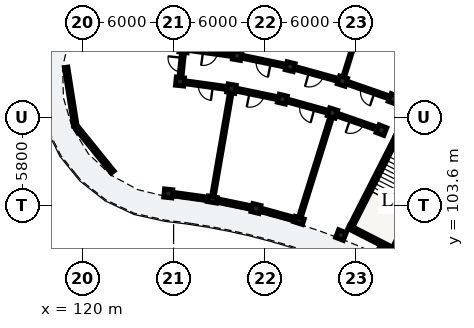
"""IFC4 building model, lengths in metres.
Left out: names, types, materials, properties, quantities, classifications, styles, units other than length and angle.
Written with IfcOpenShell. Run it as: python <this file> out.ifc"""

import sys

from ifc_helpers import new_model, si_unit, direction, frame, frame_2d, origin, origin_2d, place, context, subcontext, project, spatial, rectangle, extrude, element, fill, save


model = new_model("IFC4")
c1 = context("Model", 3, precision=1e-05, world=origin(), true_north=direction((0.0, 1.0)))
c2 = subcontext(c1, "Body", "Model", "MODEL_VIEW")
j1 = project(units=[si_unit("LENGTHUNIT", "METRE"), si_unit("PLANEANGLEUNIT", "RADIAN")], contexts=[c1])
p1 = place(None, origin())
s1 = spatial("IfcSite", under=j1, at=p1, CompositionType="ELEMENT")
p2 = place(p1, origin())
s2 = spatial("IfcBuilding", under=s1, at=p2, CompositionType="ELEMENT")
p3 = place(p2, frame((0.0, 0.0, 15.56)))
s3 = spatial("IfcBuildingStorey", under=s2, at=p3, CompositionType="ELEMENT", Elevation=15.56)
p4 = place(p3, frame((140.684, 108.139, 0.0), z_axis=(0.0, 0.0, 1.0), x_axis=(-0.453992276384, -0.891005618941, 0.0)))
e1 = element("IfcWall", 1, at=p4, inside=s3, PredefinedType="SHEAR", context=c2, shape_type="SweptSolid", body=[
    extrude(rectangle(XDim=6.6, YDim=0.25, at=frame_2d((3.3, 0.0))), origin(), (0.0, 0.0, 1.0), 3.11),
])
p5 = place(p3, frame((137.52, 102.203, 0.0), z_axis=(0.0, 0.0, 1.0), x_axis=(0.891003540237, -0.453996356025, 0.0)))
e2 = element("IfcWall", 2, at=p5, inside=s3, PredefinedType="SHEAR", context=c2, shape_type="SweptSolid", body=[
    extrude(rectangle(XDim=3.42, YDim=0.25, at=frame_2d((1.71, 0.0))), origin(), (0.0, 0.0, 1.0), 3.11),
])
p6 = place(p3, frame((143.509, 106.699, 0.0), z_axis=(0.0, 0.0, 1.0), x_axis=(-0.453992276384, -0.891005618941, 0.0)))
e3 = element("IfcWall", 3, at=p6, inside=s3, PredefinedType="SHEAR", context=c2, shape_type="SweptSolid", body=[
    extrude(rectangle(XDim=6.6, YDim=0.25, at=frame_2d((3.3, 0.0))), origin(), (0.0, 0.0, 1.0), 3.11),
])
p7 = place(p6, frame((0.22, 0.0, 0.0)))
e4 = element("IfcOpeningElement", 4, at=p7, cuts=e3, PredefinedType="OPENING", context=c2, shape_type="SweptSolid", body=[
    extrude(rectangle(XDim=1.05, YDim=2.15, at=frame_2d((0.525, 1.075))), frame((0.0, 0.135, 0.0), z_axis=(0.0, -1.0, 0.0), x_axis=(1.0, 0.0, 0.0)), (0.0, 0.0, 1.0), 0.27),
])
for number, where, z_axis, x_axis in (
    (5, (137.01, 101.667, 0.0), (0.0, 0.0, 1.0), (0.36, 0.933, 0.0)),
    (6, (139.675, 108.57, 0.0), (0.0, 0.0, 1.0), (0.36, 0.933, 0.0)),
    (7, (140.468, 110.622, 0.0), (0.0, 0.0, 1.0), (0.36, 0.933, 0.0)),
):
    element("IfcColumn", number, at=place(p3, frame(where, z_axis=z_axis, x_axis=x_axis)), inside=s3, PredefinedType="COLUMN", context=c2, shape_type="SweptSolid", body=[
        extrude(rectangle(XDim=0.55, YDim=0.55, at=origin_2d()), origin(), (0.0, 0.0, 1.0), 3.11),
    ])
p8 = place(p3, frame((134.243, 102.631, 0.0), z_axis=(0.0, 0.0, 1.0), x_axis=(0.297930225503, 0.954587649581, 0.0)))
e8 = element("IfcColumn", 8, at=p8, inside=s3, PredefinedType="PILASTER", context=c2, shape_type="SweptSolid", body=[
    extrude(rectangle(XDim=0.38, YDim=0.62, at=origin_2d()), origin(), (0.0, 0.0, 1.0), 3.11),
])
for number, where, z_axis, x_axis in (
    (9, (136.448, 109.695, 0.0), (0.0, 0.0, 1.0), (0.298, 0.955, 0.0)),
    (10, (137.103, 111.795, 0.0), (0.0, 0.0, 1.0), (0.298, 0.955, 0.0)),
    (11, (131.418, 103.412, 0.0), (0.0, 0.0, 1.0), (0.234, 0.972, 0.0)),
    (12, (133.153, 110.606, 0.0), (0.0, 0.0, 1.0), (0.234, 0.972, 0.0)),
    (13, (133.669, 112.744, 0.0), (0.0, 0.0, 1.0), (0.234, 0.972, 0.0)),
):
    element("IfcColumn", number, at=place(p3, frame(where, z_axis=z_axis, x_axis=x_axis)), inside=s3, PredefinedType="COLUMN", context=c2, shape_type="SweptSolid", body=[
        extrude(rectangle(XDim=0.55, YDim=0.55, at=origin_2d()), origin(), (0.0, 0.0, 1.0), 3.11),
    ])
p9 = place(p3, frame((128.549, 104.004, 0.0), z_axis=(0.0, 0.0, 1.0), x_axis=(0.169827230012, 0.985473851478, 0.0)))
e14 = element("IfcColumn", 14, at=p9, inside=s3, PredefinedType="PILASTER", context=c2, shape_type="SweptSolid", body=[
    extrude(rectangle(XDim=0.38, YDim=0.62, at=origin_2d()), origin(), (0.0, 0.0, 1.0), 3.11),
])
for number, where, z_axis, x_axis in (
    (15, (129.806, 111.297, 0.0), (0.0, 0.0, 1.0), (0.17, 0.985, 0.0)),
    (16, (130.179, 113.465, 0.0), (0.0, 0.0, 1.0), (0.17, 0.985, 0.0)),
    (17, (125.646, 104.406, 0.0), (0.0, 0.0, 1.0), (0.105, 0.995, 0.0)),
    (18, (126.42, 111.766, 0.0), (0.0, 0.0, 1.0), (0.105, 0.995, 0.0)),
    (19, (126.65, 113.954, 0.0), (0.0, 0.0, 1.0), (0.105, 0.995, 0.0)),
):
    element("IfcColumn", number, at=place(p3, frame(where, z_axis=z_axis, x_axis=x_axis)), inside=s3, PredefinedType="COLUMN", context=c2, shape_type="SweptSolid", body=[
        extrude(rectangle(XDim=0.55, YDim=0.55, at=origin_2d()), origin(), (0.0, 0.0, 1.0), 3.11),
    ])
p10 = place(p3, frame((134.089, 102.674, 0.0), z_axis=(0.0, 0.0, 1.0), x_axis=(-0.963901971286, 0.266257375017, 0.0)))
e20 = element("IfcWall", 20, at=p10, inside=s3, PredefinedType="SOLIDWALL", context=c2, shape_type="SweptSolid", body=[
    extrude(rectangle(XDim=2.525, YDim=0.24, at=frame_2d((1.263, 0.0))), origin(), (0.0, 0.0, 1.0), 2.355),
])
p11 = place(p10, frame((0.583, 0.0, 0.55)))
e21 = element("IfcOpeningElement", 21, at=p11, cuts=e20, PredefinedType="OPENING", context=c2, shape_type="SweptSolid", body=[
    extrude(rectangle(XDim=1.36, YDim=1.61, at=frame_2d((0.68, 0.805))), frame((0.0, 0.13, 0.0), z_axis=(0.0, -1.0, 0.0), x_axis=(1.0, 0.0, 0.0)), (0.0, 0.0, 1.0), 0.26),
])
p12 = place(p3, frame((131.179, 103.461, 0.0), z_axis=(0.0, 0.0, 1.0), x_axis=(-0.979353576928, 0.202154820272, 0.0)))
e22 = element("IfcWall", 22, at=p12, inside=s3, PredefinedType="SOLIDWALL", context=c2, shape_type="SweptSolid", body=[
    extrude(rectangle(XDim=2.525, YDim=0.24, at=frame_2d((1.263, 0.0))), origin(), (0.0, 0.0, 1.0), 2.355),
])
p13 = place(p12, frame((0.523, 0.0, 0.55)))
e23 = element("IfcOpeningElement", 23, at=p13, cuts=e22, PredefinedType="OPENING", context=c2, shape_type="SweptSolid", body=[
    extrude(rectangle(XDim=1.48, YDim=1.46, at=frame_2d((0.74, 0.73))), frame((0.0, 0.13, 0.0), z_axis=(0.0, -1.0, 0.0), x_axis=(1.0, 0.0, 0.0)), (0.0, 0.0, 1.0), 0.26),
])
p14 = place(p3, frame((128.39, 104.026, 0.0), z_axis=(0.0, 0.0, 1.0), x_axis=(-0.990545622952, 0.13718370476, 0.0)))
e24 = element("IfcWall", 24, at=p14, inside=s3, PredefinedType="SOLIDWALL", context=c2, shape_type="SweptSolid", body=[
    extrude(rectangle(XDim=2.525, YDim=0.24, at=frame_2d((1.263, 0.0))), origin(), (0.0, 0.0, 1.0), 2.355),
])
p15 = place(p14, frame((0.463, 0.0, 0.55)))
e25 = element("IfcOpeningElement", 25, at=p15, cuts=e24, PredefinedType="OPENING", context=c2, shape_type="SweptSolid", body=[
    extrude(rectangle(XDim=1.6, YDim=1.535, at=frame_2d((0.8, 0.768))), frame((0.0, 0.13, 0.0), z_axis=(0.0, -1.0, 0.0), x_axis=(1.0, 0.0, 0.0)), (0.0, 0.0, 1.0), 0.26),
])
p16 = place(p3, frame((121.998, 105.807, 0.0), z_axis=(0.0, 0.0, 1.0), x_axis=(-0.629331205321, 0.777137204109, 0.0)))
e26 = element("IfcWall", 26, at=p16, inside=s3, PredefinedType="SOLIDWALL", context=c2, shape_type="SweptSolid", body=[
    extrude(rectangle(XDim=3.908, YDim=0.24, at=frame_2d((1.954, 0.0))), origin(), (0.0, 0.0, 1.0), 2.355),
])
p17 = place(p3, frame((119.538, 108.844, 0.0), z_axis=(0.0, 0.0, 1.0), x_axis=(-0.15648221771, 0.987680776132, 0.0)))
e27 = element("IfcWall", 27, at=p17, inside=s3, PredefinedType="SOLIDWALL", context=c2, shape_type="SweptSolid", body=[
    extrude(rectangle(XDim=3.908, YDim=0.24, at=frame_2d((1.954, 0.0))), origin(), (0.0, 0.0, 1.0), 2.355),
])
p18 = place(p17, frame((1.029, 0.0, 0.4)))
e28 = element("IfcOpeningElement", 28, at=p18, cuts=e27, PredefinedType="OPENING", context=c2, shape_type="SweptSolid", body=[
    extrude(rectangle(XDim=1.85, YDim=1.72, at=frame_2d((0.925, 0.86))), frame((0.0, 0.13, 0.0), z_axis=(0.0, -1.0, 0.0), x_axis=(1.0, 0.0, 0.0)), (0.0, 0.0, 1.0), 0.26),
])
p19 = place(p3, frame((140.137, 110.738, 0.0), z_axis=(0.0, 0.0, 1.0), x_axis=(-0.944253820929, 0.329218349522, 0.0)))
e29 = element("IfcWall", 29, at=p19, inside=s3, PredefinedType="PARTITIONING", context=c2, shape_type="SweptSolid", body=[
    extrude(rectangle(XDim=2.863, YDim=0.205, at=frame_2d((1.432, 0.0))), origin(), (0.0, 0.0, 1.0), 2.37),
])
p20 = place(p19, frame((0.967, 0.0, 0.0)))
e30 = element("IfcOpeningElement", 30, at=p20, cuts=e29, PredefinedType="OPENING", context=c2, shape_type="SweptSolid", body=[
    extrude(rectangle(XDim=0.93, YDim=2.12, at=frame_2d((0.465, 1.06))), frame((0.0, 0.113, 0.0), z_axis=(0.0, -1.0, 0.0), x_axis=(1.0, 0.0, 0.0)), (0.0, 0.0, 1.0), 0.225),
])
p21 = place(p3, frame((139.345, 108.685, 0.0), z_axis=(0.0, 0.0, 1.0), x_axis=(-0.944265123647, 0.329185929627, 0.0)))
e31 = element("IfcWall", 31, at=p21, inside=s3, PredefinedType="PARTITIONING", context=c2, shape_type="SweptSolid", body=[
    extrude(rectangle(XDim=2.718, YDim=0.205, at=frame_2d((1.359, 0.0))), origin(), (0.0, 0.0, 1.0), 2.37),
])
p22 = place(p21, frame((0.894, 0.0, 0.0)))
e32 = element("IfcOpeningElement", 32, at=p22, cuts=e31, PredefinedType="OPENING", context=c2, shape_type="SweptSolid", body=[
    extrude(rectangle(XDim=0.93, YDim=2.12, at=frame_2d((0.465, 1.06))), frame((0.0, 0.113, 0.0), z_axis=(0.0, -1.0, 0.0), x_axis=(1.0, 0.0, 0.0)), (0.0, 0.0, 1.0), 0.225),
])
p23 = place(p3, frame((137.222, 112.177, 0.0), z_axis=(0.0, 0.0, 1.0), x_axis=(0.297905254614, 0.954595442726, 0.0)))
e33 = element("IfcWall", 33, at=p23, inside=s3, PredefinedType="PARTITIONING", context=c2, shape_type="SweptSolid", body=[
    extrude(rectangle(XDim=4.7, YDim=0.125, at=frame_2d((2.35, 0.0))), origin(), (0.0, 0.0, 1.0), 2.37),
])
p24 = place(p23, frame((1.895, 0.0, 0.0)))
e34 = element("IfcOpeningElement", 34, at=p24, cuts=e33, PredefinedType="OPENING", context=c2, shape_type="SweptSolid", body=[
    extrude(rectangle(XDim=0.91, YDim=2.1, at=frame_2d((0.455, 1.05))), frame((0.0, 0.073, 0.0), z_axis=(0.0, -1.0, 0.0), x_axis=(1.0, 0.0, 0.0)), (0.0, 0.0, 1.0), 0.145),
])
p25 = place(p3, frame((134.362, 103.013, 0.0), z_axis=(0.0, 0.0, 1.0), x_axis=(0.2979590431, 0.954578655028, 0.0)))
e35 = element("IfcWall", 35, at=p25, inside=s3, PredefinedType="PARTITIONING", context=c2, shape_type="SweptSolid", body=[
    extrude(rectangle(XDim=6.6, YDim=0.185, at=frame_2d((3.3, 0.0))), origin(), (0.0, 0.0, 1.0), 2.37),
])
p26 = place(p3, frame((136.766, 111.889, 0.0), z_axis=(0.0, 0.0, 1.0), x_axis=(-0.963890789093, 0.266297853356, 0.0)))
e36 = element("IfcWall", 36, at=p26, inside=s3, PredefinedType="PARTITIONING", context=c2, shape_type="SweptSolid", body=[
    extrude(rectangle(XDim=2.863, YDim=0.205, at=frame_2d((1.432, 0.0))), origin(), (0.0, 0.0, 1.0), 2.37),
])
p27 = place(p26, frame((0.937, 0.0, 0.0)))
e37 = element("IfcOpeningElement", 37, at=p27, cuts=e36, PredefinedType="OPENING", context=c2, shape_type="SweptSolid", body=[
    extrude(rectangle(XDim=0.99, YDim=2.16, at=frame_2d((0.495, 1.08))), frame((0.0, 0.113, 0.0), z_axis=(0.0, -1.0, 0.0), x_axis=(1.0, 0.0, 0.0)), (0.0, 0.0, 1.0), 0.225),
])
p28 = place(p3, frame((136.11, 109.789, 0.0), z_axis=(0.0, 0.0, 1.0), x_axis=(-0.96388375821, 0.266323301006, 0.0)))
e38 = element("IfcWall", 38, at=p28, inside=s3, PredefinedType="PARTITIONING", context=c2, shape_type="SweptSolid", body=[
    extrude(rectangle(XDim=2.718, YDim=0.205, at=frame_2d((1.359, 0.0))), origin(), (0.0, 0.0, 1.0), 2.37),
])
p29 = place(p28, frame((0.864, 0.0, 0.0)))
e39 = element("IfcOpeningElement", 39, at=p29, cuts=e38, PredefinedType="OPENING", context=c2, shape_type="SweptSolid", body=[
    extrude(rectangle(XDim=0.99, YDim=2.16, at=frame_2d((0.495, 1.08))), frame((0.0, 0.113, 0.0), z_axis=(0.0, -1.0, 0.0), x_axis=(1.0, 0.0, 0.0)), (0.0, 0.0, 1.0), 0.225),
])
p30 = place(p3, frame((133.326, 112.815, 0.0), z_axis=(0.0, 0.0, 1.0), x_axis=(-0.979348418612, 0.202179808492, 0.0)))
e40 = element("IfcWall", 40, at=p30, inside=s3, PredefinedType="PARTITIONING", context=c2, shape_type="SweptSolid", body=[
    extrude(rectangle(XDim=2.863, YDim=0.205, at=frame_2d((1.432, 0.0))), origin(), (0.0, 0.0, 1.0), 2.37),
])
p31 = place(p30, frame((0.947, 0.0, 0.0)))
e41 = element("IfcOpeningElement", 41, at=p31, cuts=e40, PredefinedType="OPENING", context=c2, shape_type="SweptSolid", body=[
    extrude(rectangle(XDim=0.97, YDim=2.15, at=frame_2d((0.485, 1.075))), frame((0.0, 0.113, 0.0), z_axis=(0.0, -1.0, 0.0), x_axis=(1.0, 0.0, 0.0)), (0.0, 0.0, 1.0), 0.225),
])
p32 = place(p3, frame((132.81, 110.677, 0.0), z_axis=(0.0, 0.0, 1.0), x_axis=(-0.979349423541, 0.202174940608, 0.0)))
e42 = element("IfcWall", 42, at=p32, inside=s3, PredefinedType="PARTITIONING", context=c2, shape_type="SweptSolid", body=[
    extrude(rectangle(XDim=2.718, YDim=0.205, at=frame_2d((1.359, 0.0))), origin(), (0.0, 0.0, 1.0), 2.37),
])
p33 = place(p32, frame((0.874, 0.0, 0.0)))
e43 = element("IfcOpeningElement", 43, at=p33, cuts=e42, PredefinedType="OPENING", context=c2, shape_type="SweptSolid", body=[
    extrude(rectangle(XDim=0.97, YDim=2.15, at=frame_2d((0.485, 1.075))), frame((0.0, 0.113, 0.0), z_axis=(0.0, -1.0, 0.0), x_axis=(1.0, 0.0, 0.0)), (0.0, 0.0, 1.0), 0.225),
])
p34 = place(p3, frame((128.617, 104.398, 0.0), z_axis=(0.0, 0.0, 1.0), x_axis=(0.169825160084, 0.985474208187, 0.0)))
e44 = element("IfcWall", 44, at=p34, inside=s3, PredefinedType="PARTITIONING", context=c2, shape_type="SweptSolid", body=[
    extrude(rectangle(XDim=6.6, YDim=0.185, at=frame_2d((3.3, 0.0))), origin(), (0.0, 0.0, 1.0), 2.37),
])
p35 = place(p3, frame((129.833, 113.513, 0.0), z_axis=(0.0, 0.0, 1.0), x_axis=(-0.990544162976, 0.137194246211, 0.0)))
e45 = element("IfcWall", 45, at=p35, inside=s3, PredefinedType="PARTITIONING", context=c2, shape_type="SweptSolid", body=[
    extrude(rectangle(XDim=2.863, YDim=0.205, at=frame_2d((1.432, 0.0))), origin(), (0.0, 0.0, 1.0), 2.37),
])
p36 = place(p35, frame((0.957, 0.0, 0.0)))
e46 = element("IfcOpeningElement", 46, at=p36, cuts=e45, PredefinedType="OPENING", context=c2, shape_type="SweptSolid", body=[
    extrude(rectangle(XDim=0.95, YDim=2.13, at=frame_2d((0.475, 1.065))), frame((0.0, 0.113, 0.0), z_axis=(0.0, -1.0, 0.0), x_axis=(1.0, 0.0, 0.0)), (0.0, 0.0, 1.0), 0.225),
])
p37 = place(p3, frame((129.459, 111.345, 0.0), z_axis=(0.0, 0.0, 1.0), x_axis=(-0.990535404475, 0.137257467855, 0.0)))
e47 = element("IfcWall", 47, at=p37, inside=s3, PredefinedType="PARTITIONING", context=c2, shape_type="SweptSolid", body=[
    extrude(rectangle(XDim=2.718, YDim=0.205, at=frame_2d((1.359, 0.0))), origin(), (0.0, 0.0, 1.0), 2.37),
])
p38 = place(p37, frame((0.884, 0.0, 0.0)))
e48 = element("IfcOpeningElement", 48, at=p38, cuts=e47, PredefinedType="OPENING", context=c2, shape_type="SweptSolid", body=[
    extrude(rectangle(XDim=0.95, YDim=2.13, at=frame_2d((0.475, 1.065))), frame((0.0, 0.113, 0.0), z_axis=(0.0, -1.0, 0.0), x_axis=(1.0, 0.0, 0.0)), (0.0, 0.0, 1.0), 0.225),
])
p39 = place(p3, frame((126.425, 111.816, 0.0), z_axis=(0.0, 0.0, 1.0), x_axis=(0.104509292252, 0.994523910136, 0.0)))
e49 = element("IfcWall", 49, at=p39, inside=s3, PredefinedType="PARTITIONING", context=c2, shape_type="SweptSolid", body=[
    extrude(rectangle(XDim=2.1, YDim=0.205, at=frame_2d((1.05, 0.0))), origin(), (0.0, 0.0, 1.0), 2.37),
])
p40 = place(p39, frame((0.57, 0.0, 0.0)))
e50 = element("IfcOpeningElement", 50, at=p40, cuts=e49, PredefinedType="OPENING", context=c2, shape_type="SweptSolid", body=[
    extrude(rectangle(XDim=0.95, YDim=2.13, at=frame_2d((0.475, 1.065))), frame((0.0, 0.113, 0.0), z_axis=(0.0, -1.0, 0.0), x_axis=(1.0, 0.0, 0.0)), (0.0, 0.0, 1.0), 0.225),
])
p41 = place(p11, origin())
e51 = element("IfcWindow", 51, at=p41, inside=s3, PartitioningType="SINGLE_PANEL", PredefinedType="WINDOW", context=c2, shape_type="SweptSolid", body=[
    extrude(rectangle(XDim=1.36, YDim=1.61, at=frame_2d((0.68, 0.805))), frame((0.0, 0.03, 0.0), z_axis=(0.0, -1.0, 0.0), x_axis=(1.0, 0.0, 0.0)), (0.0, 0.0, 1.0), 0.06),
])
fill(e21, e51)
p42 = place(p13, origin())
e52 = element("IfcWindow", 52, at=p42, inside=s3, PartitioningType="SINGLE_PANEL", PredefinedType="WINDOW", context=c2, shape_type="SweptSolid", body=[
    extrude(rectangle(XDim=1.48, YDim=1.46, at=frame_2d((0.74, 0.73))), frame((0.0, 0.03, 0.0), z_axis=(0.0, -1.0, 0.0), x_axis=(1.0, 0.0, 0.0)), (0.0, 0.0, 1.0), 0.06),
])
fill(e23, e52)
p43 = place(p15, origin())
e53 = element("IfcWindow", 53, at=p43, inside=s3, PartitioningType="SINGLE_PANEL", PredefinedType="WINDOW", context=c2, shape_type="SweptSolid", body=[
    extrude(rectangle(XDim=1.6, YDim=1.535, at=frame_2d((0.8, 0.768))), frame((0.0, 0.03, 0.0), z_axis=(0.0, -1.0, 0.0), x_axis=(1.0, 0.0, 0.0)), (0.0, 0.0, 1.0), 0.06),
])
fill(e25, e53)
p44 = place(p18, origin())
e54 = element("IfcWindow", 54, at=p44, inside=s3, PartitioningType="SINGLE_PANEL", PredefinedType="WINDOW", context=c2, shape_type="SweptSolid", body=[
    extrude(rectangle(XDim=1.85, YDim=1.72, at=frame_2d((0.925, 0.86))), frame((0.0, 0.03, 0.0), z_axis=(0.0, -1.0, 0.0), x_axis=(1.0, 0.0, 0.0)), (0.0, 0.0, 1.0), 0.06),
])
fill(e28, e54)
p45 = place(p20, origin())
e55 = element("IfcDoor", 55, at=p45, inside=s3, OperationType="SINGLE_SWING_LEFT", PredefinedType="DOOR", context=c2, shape_type="SweptSolid", body=[
    extrude(rectangle(XDim=0.93, YDim=2.12, at=frame_2d((0.465, 1.06))), frame((0.0, 0.025, 0.0), z_axis=(0.0, -1.0, 0.0), x_axis=(1.0, 0.0, 0.0)), (0.0, 0.0, 1.0), 0.05),
])
fill(e30, e55)
p46 = place(p22, origin())
e56 = element("IfcDoor", 56, at=p46, inside=s3, OperationType="SINGLE_SWING_RIGHT", PredefinedType="DOOR", context=c2, shape_type="SweptSolid", body=[
    extrude(rectangle(XDim=0.93, YDim=2.12, at=frame_2d((0.465, 1.06))), frame((0.0, 0.025, 0.0), z_axis=(0.0, -1.0, 0.0), x_axis=(1.0, 0.0, 0.0)), (0.0, 0.0, 1.0), 0.05),
])
fill(e32, e56)
p47 = place(p27, origin())
e57 = element("IfcDoor", 57, at=p47, inside=s3, OperationType="SINGLE_SWING_RIGHT", PredefinedType="DOOR", context=c2, shape_type="SweptSolid", body=[
    extrude(rectangle(XDim=0.99, YDim=2.16, at=frame_2d((0.495, 1.08))), frame((0.0, 0.025, 0.0), z_axis=(0.0, -1.0, 0.0), x_axis=(1.0, 0.0, 0.0)), (0.0, 0.0, 1.0), 0.05),
])
fill(e37, e57)
p48 = place(p29, origin())
e58 = element("IfcDoor", 58, at=p48, inside=s3, OperationType="SINGLE_SWING_LEFT", PredefinedType="DOOR", context=c2, shape_type="SweptSolid", body=[
    extrude(rectangle(XDim=0.99, YDim=2.16, at=frame_2d((0.495, 1.08))), frame((0.0, 0.025, 0.0), z_axis=(0.0, -1.0, 0.0), x_axis=(1.0, 0.0, 0.0)), (0.0, 0.0, 1.0), 0.05),
])
fill(e39, e58)
p49 = place(p31, origin())
e59 = element("IfcDoor", 59, at=p49, inside=s3, OperationType="SINGLE_SWING_LEFT", PredefinedType="DOOR", context=c2, shape_type="SweptSolid", body=[
    extrude(rectangle(XDim=0.97, YDim=2.15, at=frame_2d((0.485, 1.075))), frame((0.0, 0.025, 0.0), z_axis=(0.0, -1.0, 0.0), x_axis=(1.0, 0.0, 0.0)), (0.0, 0.0, 1.0), 0.05),
])
fill(e41, e59)
p50 = place(p33, origin())
e60 = element("IfcDoor", 60, at=p50, inside=s3, OperationType="SINGLE_SWING_RIGHT", PredefinedType="DOOR", context=c2, shape_type="SweptSolid", body=[
    extrude(rectangle(XDim=0.97, YDim=2.15, at=frame_2d((0.485, 1.075))), frame((0.0, 0.025, 0.0), z_axis=(0.0, -1.0, 0.0), x_axis=(1.0, 0.0, 0.0)), (0.0, 0.0, 1.0), 0.05),
])
fill(e43, e60)
p51 = place(p36, origin())
e61 = element("IfcDoor", 61, at=p51, inside=s3, OperationType="SINGLE_SWING_RIGHT", PredefinedType="DOOR", context=c2, shape_type="SweptSolid", body=[
    extrude(rectangle(XDim=0.95, YDim=2.13, at=frame_2d((0.475, 1.065))), frame((0.0, 0.025, 0.0), z_axis=(0.0, -1.0, 0.0), x_axis=(1.0, 0.0, 0.0)), (0.0, 0.0, 1.0), 0.05),
])
fill(e46, e61)
p52 = place(p38, origin())
e62 = element("IfcDoor", 62, at=p52, inside=s3, OperationType="SINGLE_SWING_LEFT", PredefinedType="DOOR", context=c2, shape_type="SweptSolid", body=[
    extrude(rectangle(XDim=0.95, YDim=2.13, at=frame_2d((0.475, 1.065))), frame((0.0, 0.025, 0.0), z_axis=(0.0, -1.0, 0.0), x_axis=(1.0, 0.0, 0.0)), (0.0, 0.0, 1.0), 0.05),
])
fill(e48, e62)
p53 = place(p40, origin())
e63 = element("IfcDoor", 63, at=p53, inside=s3, OperationType="SINGLE_SWING_RIGHT", PredefinedType="DOOR", context=c2, shape_type="SweptSolid", body=[
    extrude(rectangle(XDim=0.95, YDim=2.13, at=frame_2d((0.475, 1.065))), frame((0.0, 0.025, 0.0), z_axis=(0.0, -1.0, 0.0), x_axis=(1.0, 0.0, 0.0)), (0.0, 0.0, 1.0), 0.05),
])
fill(e50, e63)
save(model, sys.argv[1])
